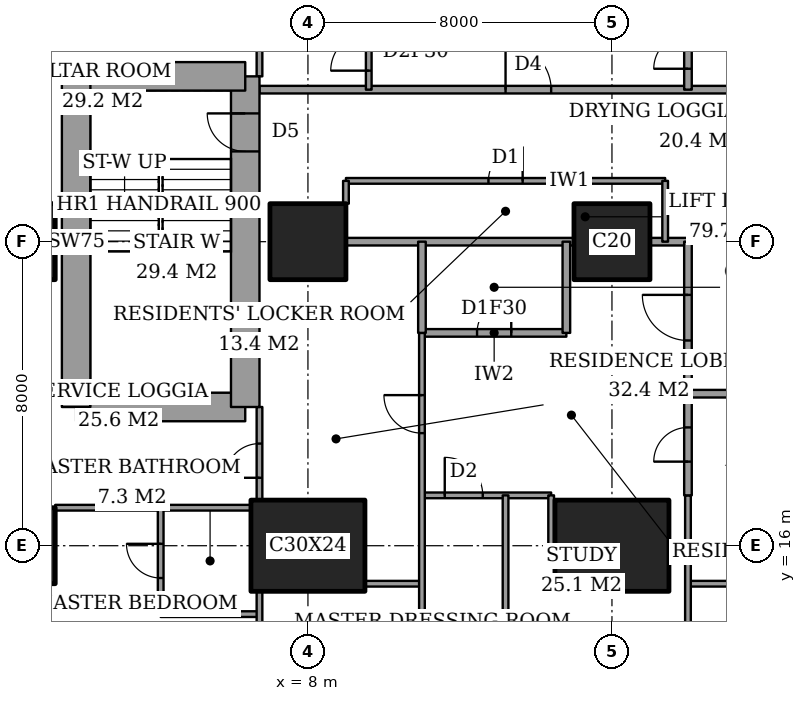
"""IFC4 building model, lengths in metres.
Left out: names, types, materials, properties, quantities, classifications, styles, units other than length and angle.
Written with IfcOpenShell. Run it as: python <this file> out.ifc"""

import sys

from ifc_helpers import new_model, si_unit, direction, frame, frame_2d, origin, origin_2d, place, context, subcontext, project, spatial, rectangle, extrude, element, fill, save


model = new_model("IFC4")
c1 = context("Model", 3, precision=1e-05, world=origin(), true_north=direction((0.0, 1.0)))
c2 = subcontext(c1, "Body", "Model", "MODEL_VIEW")
j1 = project(units=[si_unit("LENGTHUNIT", "METRE"), si_unit("PLANEANGLEUNIT", "RADIAN")], contexts=[c1])
p1 = place(None, origin())
s1 = spatial("IfcSite", under=j1, at=p1, CompositionType="ELEMENT")
p2 = place(p1, origin())
s2 = spatial("IfcBuilding", under=s1, at=p2, CompositionType="ELEMENT")
p3 = place(p2, frame((0.0, 0.0, 146.6)))
s3 = spatial("IfcBuildingStorey", under=s2, at=p3, CompositionType="ELEMENT", Elevation=146.6)
for number, where, z_axis, x_axis in (
    (1, (0.35, 16.0, 0.0), (0.0, 0.0, 1.0), (1.0, 0.0, 0.0)),
    (2, (0.35, 24.0, 0.0), (0.0, 0.0, 1.0), (1.0, 0.0, 0.0)),
):
    element("IfcColumn", number, at=place(p3, frame(where, z_axis=z_axis, x_axis=x_axis)), inside=s3, PredefinedType="COLUMN", context=c2, shape_type="SweptSolid", body=[
        extrude(rectangle(XDim=2.0, YDim=2.0, at=origin_2d()), origin(), (0.0, 0.0, 1.0), 3.6),
    ])
p4 = place(p3, frame((8.0, 16.0, 0.0), z_axis=(0.0, 0.0, 1.0), x_axis=(1.0, 0.0, 0.0)))
e3 = element("IfcColumn", 3, at=p4, inside=s3, PredefinedType="COLUMN", context=c2, shape_type="SweptSolid", body=[
    extrude(rectangle(XDim=3.0, YDim=2.4, at=origin_2d()), origin(), (0.0, 0.0, 1.0), 3.6),
])
p5 = place(p3, frame((8.0, 24.0, 0.0), z_axis=(0.0, 0.0, 1.0), x_axis=(1.0, 0.0, 0.0)))
e4 = element("IfcColumn", 4, at=p5, inside=s3, PredefinedType="COLUMN", context=c2, shape_type="SweptSolid", body=[
    extrude(rectangle(XDim=2.0, YDim=2.0, at=origin_2d()), origin(), (0.0, 0.0, 1.0), 3.6),
])
p6 = place(p3, frame((16.0, 16.0, 0.0), z_axis=(0.0, 0.0, 1.0), x_axis=(1.0, 0.0, 0.0)))
e5 = element("IfcColumn", 5, at=p6, inside=s3, PredefinedType="COLUMN", context=c2, shape_type="SweptSolid", body=[
    extrude(rectangle(XDim=3.0, YDim=2.4, at=origin_2d()), origin(), (0.0, 0.0, 1.0), 3.6),
])
p7 = place(p3, frame((16.0, 24.0, 0.0), z_axis=(0.0, 0.0, 1.0), x_axis=(1.0, 0.0, 0.0)))
e6 = element("IfcColumn", 6, at=p7, inside=s3, PredefinedType="COLUMN", context=c2, shape_type="SweptSolid", body=[
    extrude(rectangle(XDim=2.0, YDim=2.0, at=origin_2d()), origin(), (0.0, 0.0, 1.0), 3.6),
])
p8 = place(p3, frame((1.9, 19.65, 0.0), z_axis=(0.0, 0.0, 1.0), x_axis=(1.0, 0.0, 0.0)))
e7 = element("IfcWall", 7, at=p8, inside=s3, PredefinedType="SHEAR", context=c2, shape_type="SweptSolid", body=[
    extrude(rectangle(XDim=4.45, YDim=0.75, at=frame_2d((2.225, 0.0))), origin(), (0.0, 0.0, 1.0), 3.6),
])
p9 = place(p3, frame((6.35, 19.65, 0.0), z_axis=(0.0, 0.0, 1.0), x_axis=(0.0, 1.0, 0.0)))
e8 = element("IfcWall", 8, at=p9, inside=s3, PredefinedType="SHEAR", context=c2, shape_type="SweptSolid", body=[
    extrude(rectangle(XDim=8.7, YDim=0.75, at=frame_2d((4.35, 0.0))), origin(), (0.0, 0.0, 1.0), 3.6),
])
p10 = place(p9, frame((6.725, 0.0, 0.0)))
e9 = element("IfcOpeningElement", 9, at=p10, cuts=e8, PredefinedType="OPENING", context=c2, shape_type="SweptSolid", body=[
    extrude(rectangle(XDim=1.0, YDim=2.1, at=frame_2d((0.5, 1.05))), frame((0.0, 0.385, 0.0), z_axis=(0.0, -1.0, 0.0), x_axis=(1.0, 0.0, 0.0)), (0.0, 0.0, 1.0), 0.77),
])
p11 = place(p3, frame((6.35, 28.35, 0.0), z_axis=(0.0, 0.0, 1.0), x_axis=(-1.0, 0.0, 0.0)))
e10 = element("IfcWall", 10, at=p11, inside=s3, PredefinedType="SHEAR", context=c2, shape_type="SweptSolid", body=[
    extrude(rectangle(XDim=4.45, YDim=0.75, at=frame_2d((2.225, 0.0))), origin(), (0.0, 0.0, 1.0), 3.6),
])
p12 = place(p3, frame((1.9, 28.35, 0.0), z_axis=(0.0, 0.0, 1.0), x_axis=(0.0, -1.0, 0.0)))
e11 = element("IfcWall", 11, at=p12, inside=s3, PredefinedType="SHEAR", context=c2, shape_type="SweptSolid", body=[
    extrude(rectangle(XDim=8.7, YDim=0.75, at=frame_2d((4.35, 0.0))), origin(), (0.0, 0.0, 1.0), 3.6),
])
p13 = place(p3, frame((4.125, 14.2, 0.0), z_axis=(0.0, 0.0, 1.0), x_axis=(1.0, 0.0, 0.0)))
e12 = element("IfcWall", 12, at=p13, inside=s3, PredefinedType="PARTITIONING", context=c2, shape_type="SweptSolid", body=[
    extrude(rectangle(XDim=2.6, YDim=0.15, at=frame_2d((1.3, 0.0))), origin(), (0.0, 0.0, 1.0), 3.35),
])
p14 = place(p3, frame((9.5, 15.0, 0.0), z_axis=(0.0, 0.0, 1.0), x_axis=(1.0, 0.0, 0.0)))
e13 = element("IfcWall", 13, at=p14, inside=s3, PredefinedType="PARTITIONING", context=c2, shape_type="SweptSolid", body=[
    extrude(rectangle(XDim=1.5, YDim=0.15, at=frame_2d((0.75, 0.0))), origin(), (0.0, 0.0, 1.0), 3.35),
])
p15 = place(p3, frame((18.0, 15.0, 0.0), z_axis=(0.0, 0.0, 1.0), x_axis=(1.0, 0.0, 0.0)))
e14 = element("IfcWall", 14, at=p15, inside=s3, PredefinedType="PARTITIONING", context=c2, shape_type="SweptSolid", body=[
    extrude(rectangle(XDim=6.0, YDim=0.15, at=frame_2d((3.0, 0.0))), origin(), (0.0, 0.0, 1.0), 3.35),
])
p16 = place(p3, frame((17.5, 15.875, 0.0), z_axis=(0.0, 0.0, 1.0), x_axis=(1.0, 0.0, 0.0)))
e15 = element("IfcWall", 15, at=p16, inside=s3, PredefinedType="PARTITIONING", context=c2, shape_type="SweptSolid", body=[
    extrude(rectangle(XDim=0.5, YDim=0.15, at=frame_2d((0.25, 0.0))), origin(), (0.0, 0.0, 1.0), 2.634),
])
p17 = place(p3, frame((1.35, 17.0, 0.0), z_axis=(0.0, 0.0, 1.0), x_axis=(1.0, 0.0, 0.0)))
e16 = element("IfcWall", 16, at=p17, inside=s3, PredefinedType="PARTITIONING", context=c2, shape_type="SweptSolid", body=[
    extrude(rectangle(XDim=5.15, YDim=0.15, at=frame_2d((2.575, 0.0))), origin(), (0.0, 0.0, 1.0), 3.35),
])
p18 = place(p3, frame((11.0, 17.325, 0.0), z_axis=(0.0, 0.0, 1.0), x_axis=(1.0, 0.0, 0.0)))
e17 = element("IfcWall", 17, at=p18, inside=s3, PredefinedType="PARTITIONING", context=c2, shape_type="SweptSolid", body=[
    extrude(rectangle(XDim=3.4, YDim=0.15, at=frame_2d((1.7, 0.0))), origin(), (0.0, 0.0, 1.0), 3.35),
])
p19 = place(p18, frame((0.6, 0.0, 0.0)))
e18 = element("IfcOpeningElement", 18, at=p19, cuts=e17, PredefinedType="OPENING", context=c2, shape_type="SweptSolid", body=[
    extrude(rectangle(XDim=1.0, YDim=2.1, at=frame_2d((0.5, 1.05))), frame((0.0, 0.085, 0.0), z_axis=(0.0, -1.0, 0.0), x_axis=(1.0, 0.0, 0.0)), (0.0, 0.0, 1.0), 0.17),
])
p20 = place(p3, frame((18.0, 20.0, 0.0), z_axis=(0.0, 0.0, 1.0), x_axis=(1.0, 0.0, 0.0)))
e19 = element("IfcWall", 19, at=p20, inside=s3, PredefinedType="PARTITIONING", context=c2, shape_type="SweptSolid", body=[
    extrude(rectangle(XDim=6.0, YDim=0.2, at=frame_2d((3.0, 0.0))), origin(), (0.0, 0.0, 1.0), 3.35),
])
p21 = place(p3, frame((11.0, 21.6, 0.0), z_axis=(0.0, 0.0, 1.0), x_axis=(1.0, 0.0, 0.0)))
e20 = element("IfcWall", 20, at=p21, inside=s3, PredefinedType="PARTITIONING", context=c2, shape_type="SweptSolid", body=[
    extrude(rectangle(XDim=3.8, YDim=0.2, at=frame_2d((1.9, 0.0))), origin(), (0.0, 0.0, 1.0), 3.35),
])
p22 = place(p21, frame((1.45, 0.0, 0.0)))
e21 = element("IfcOpeningElement", 21, at=p22, cuts=e20, PredefinedType="OPENING", context=c2, shape_type="SweptSolid", body=[
    extrude(rectangle(XDim=0.9, YDim=2.1, at=frame_2d((0.45, 1.05))), frame((0.0, 0.11, 0.0), z_axis=(0.0, -1.0, 0.0), x_axis=(1.0, 0.0, 0.0)), (0.0, 0.0, 1.0), 0.22),
])
p23 = place(p3, frame((9.0, 24.0, 0.0), z_axis=(0.0, 0.0, 1.0), x_axis=(1.0, 0.0, 0.0)))
e22 = element("IfcWall", 22, at=p23, inside=s3, PredefinedType="PARTITIONING", context=c2, shape_type="SweptSolid", body=[
    extrude(rectangle(XDim=6.0, YDim=0.2, at=frame_2d((3.0, 0.0))), origin(), (0.0, 0.0, 1.0), 3.35),
])
p24 = place(p3, frame((17.0, 24.0, 0.0), z_axis=(0.0, 0.0, 1.0), x_axis=(1.0, 0.0, 0.0)))
e23 = element("IfcWall", 23, at=p24, inside=s3, PredefinedType="PARTITIONING", context=c2, shape_type="SweptSolid", body=[
    extrude(rectangle(XDim=1.0, YDim=0.2, at=frame_2d((0.5, 0.0))), origin(), (0.0, 0.0, 1.0), 3.35),
])
p25 = place(p3, frame((9.0, 25.6, 0.0), z_axis=(0.0, 0.0, 1.0), x_axis=(1.0, 0.0, 0.0)))
e24 = element("IfcWall", 24, at=p25, inside=s3, PredefinedType="PARTITIONING", context=c2, shape_type="SweptSolid", body=[
    extrude(rectangle(XDim=8.4, YDim=0.15, at=frame_2d((4.2, 0.0))), origin(), (0.0, 0.0, 1.0), 3.35),
])
p26 = place(p25, frame((3.75, 0.0, 0.0)))
e25 = element("IfcOpeningElement", 25, at=p26, cuts=e24, PredefinedType="OPENING", context=c2, shape_type="SweptSolid", body=[
    extrude(rectangle(XDim=0.9, YDim=2.1, at=frame_2d((0.45, 1.05))), frame((0.0, 0.085, 0.0), z_axis=(0.0, -1.0, 0.0), x_axis=(1.0, 0.0, 0.0)), (0.0, 0.0, 1.0), 0.17),
])
p27 = place(p3, frame((6.725, 28.0, 0.0), z_axis=(0.0, 0.0, 1.0), x_axis=(1.0, 0.0, 0.0)))
e26 = element("IfcWall", 26, at=p27, inside=s3, PredefinedType="PARTITIONING", context=c2, shape_type="SweptSolid", body=[
    extrude(rectangle(XDim=17.275, YDim=0.2, at=frame_2d((8.637, 0.0))), origin(), (0.0, 0.0, 1.0), 3.35),
])
p28 = place(p27, frame((6.475, 0.0, 0.0)))
e27 = element("IfcOpeningElement", 27, at=p28, cuts=e26, PredefinedType="OPENING", context=c2, shape_type="SweptSolid", body=[
    extrude(rectangle(XDim=1.2, YDim=2.4, at=frame_2d((0.6, 1.2))), frame((0.0, 0.11, 0.0), z_axis=(0.0, -1.0, 0.0), x_axis=(1.0, 0.0, 0.0)), (0.0, 0.0, 1.0), 0.22),
])
p29 = place(p3, frame((4.125, 14.2, 0.0), z_axis=(0.0, 0.0, 1.0), x_axis=(0.0, 1.0, 0.0)))
e28 = element("IfcWall", 28, at=p29, inside=s3, PredefinedType="PARTITIONING", context=c2, shape_type="SweptSolid", body=[
    extrude(rectangle(XDim=2.8, YDim=0.15, at=frame_2d((1.4, 0.0))), origin(), (0.0, 0.0, 1.0), 3.35),
])
p30 = place(p29, frame((0.95, 0.0, 0.0)))
e29 = element("IfcOpeningElement", 29, at=p30, cuts=e28, PredefinedType="OPENING", context=c2, shape_type="SweptSolid", body=[
    extrude(rectangle(XDim=0.9, YDim=2.1, at=frame_2d((0.45, 1.05))), frame((0.0, 0.085, 0.0), z_axis=(0.0, -1.0, 0.0), x_axis=(1.0, 0.0, 0.0)), (0.0, 0.0, 1.0), 0.17),
])
p31 = place(p3, frame((6.725, 11.0, 0.0), z_axis=(0.0, 0.0, 1.0), x_axis=(0.0, 1.0, 0.0)))
e30 = element("IfcWall", 30, at=p31, inside=s3, PredefinedType="PARTITIONING", context=c2, shape_type="SweptSolid", body=[
    extrude(rectangle(XDim=3.8, YDim=0.15, at=frame_2d((1.9, 0.0))), origin(), (0.0, 0.0, 1.0), 3.35),
])
p32 = place(p31, frame((1.15, 0.0, 0.0)))
e31 = element("IfcOpeningElement", 31, at=p32, cuts=e30, PredefinedType="OPENING", context=c2, shape_type="SweptSolid", body=[
    extrude(rectangle(XDim=0.9, YDim=2.1, at=frame_2d((0.45, 1.05))), frame((0.0, 0.085, 0.0), z_axis=(0.0, -1.0, 0.0), x_axis=(1.0, 0.0, 0.0)), (0.0, 0.0, 1.0), 0.17),
])
p33 = place(p3, frame((6.725, 17.2, 0.0), z_axis=(0.0, 0.0, 1.0), x_axis=(0.0, 1.0, 0.0)))
e32 = element("IfcWall", 32, at=p33, inside=s3, PredefinedType="PARTITIONING", context=c2, shape_type="SweptSolid", body=[
    extrude(rectangle(XDim=2.45, YDim=0.15, at=frame_2d((1.225, 0.0))), origin(), (0.0, 0.0, 1.0), 3.35),
])
p34 = place(p33, frame((0.587, 0.0, 0.0)))
e33 = element("IfcOpeningElement", 33, at=p34, cuts=e32, PredefinedType="OPENING", context=c2, shape_type="SweptSolid", body=[
    extrude(rectangle(XDim=0.9, YDim=2.1, at=frame_2d((0.45, 1.05))), frame((0.0, 0.085, 0.0), z_axis=(0.0, -1.0, 0.0), x_axis=(1.0, 0.0, 0.0)), (0.0, 0.0, 1.0), 0.17),
])
p35 = place(p3, frame((6.725, 28.35, 0.0), z_axis=(0.0, 0.0, 1.0), x_axis=(0.0, 1.0, 0.0)))
e34 = element("IfcWall", 34, at=p35, inside=s3, PredefinedType="PARTITIONING", context=c2, shape_type="SweptSolid", body=[
    extrude(rectangle(XDim=2.45, YDim=0.15, at=frame_2d((1.225, 0.0))), origin(), (0.0, 0.0, 1.0), 3.35),
])
p36 = place(p35, frame((0.913, 0.0, 0.0)))
e35 = element("IfcOpeningElement", 35, at=p36, cuts=e34, PredefinedType="OPENING", context=c2, shape_type="SweptSolid", body=[
    extrude(rectangle(XDim=1.0, YDim=2.1, at=frame_2d((0.5, 1.05))), frame((0.0, 0.085, 0.0), z_axis=(0.0, -1.0, 0.0), x_axis=(1.0, 0.0, 0.0)), (0.0, 0.0, 1.0), 0.17),
])
p37 = place(p3, frame((9.0, 25.0, 0.0), z_axis=(0.0, 0.0, 1.0), x_axis=(0.0, 1.0, 0.0)))
e36 = element("IfcWall", 36, at=p37, inside=s3, PredefinedType="PARTITIONING", context=c2, shape_type="SweptSolid", body=[
    extrude(rectangle(XDim=0.6, YDim=0.15, at=frame_2d((0.3, 0.0))), origin(), (0.0, 0.0, 1.0), 3.35),
])
p38 = place(p3, frame((9.6, 28.0, 0.0), z_axis=(0.0, 0.0, 1.0), x_axis=(0.0, 1.0, 0.0)))
e37 = element("IfcWall", 37, at=p38, inside=s3, PredefinedType="PARTITIONING", context=c2, shape_type="SweptSolid", body=[
    extrude(rectangle(XDim=9.4, YDim=0.15, at=frame_2d((4.7, 0.0))), origin(), (0.0, 0.0, 1.0), 3.35),
])
p39 = place(p38, frame((0.5, 0.0, 0.0)))
e38 = element("IfcOpeningElement", 38, at=p39, cuts=e37, PredefinedType="OPENING", context=c2, shape_type="SweptSolid", body=[
    extrude(rectangle(XDim=1.0, YDim=2.1, at=frame_2d((0.5, 1.05))), frame((0.0, 0.085, 0.0), z_axis=(0.0, -1.0, 0.0), x_axis=(1.0, 0.0, 0.0)), (0.0, 0.0, 1.0), 0.17),
])
p40 = place(p3, frame((11.0, 21.6, 0.0), z_axis=(0.0, 0.0, 1.0), x_axis=(0.0, 1.0, 0.0)))
e39 = element("IfcWall", 39, at=p40, inside=s3, PredefinedType="PARTITIONING", context=c2, shape_type="SweptSolid", body=[
    extrude(rectangle(XDim=2.4, YDim=0.2, at=frame_2d((1.2, 0.0))), origin(), (0.0, 0.0, 1.0), 3.35),
])
p41 = place(p3, frame((11.0, 11.0, 0.0), z_axis=(0.0, 0.0, 1.0), x_axis=(0.0, 1.0, 0.0)))
e40 = element("IfcWall", 40, at=p41, inside=s3, PredefinedType="PARTITIONING", context=c2, shape_type="SweptSolid", body=[
    extrude(rectangle(XDim=10.6, YDim=0.15, at=frame_2d((5.3, 0.0))), origin(), (0.0, 0.0, 1.0), 3.35),
])
p42 = place(p41, frame((7.962, 0.0, 0.0)))
e41 = element("IfcOpeningElement", 41, at=p42, cuts=e40, PredefinedType="OPENING", context=c2, shape_type="SweptSolid", body=[
    extrude(rectangle(XDim=1.0, YDim=2.1, at=frame_2d((0.5, 1.05))), frame((0.0, 0.085, 0.0), z_axis=(0.0, -1.0, 0.0), x_axis=(1.0, 0.0, 0.0)), (0.0, 0.0, 1.0), 0.17),
])
p43 = place(p3, frame((13.2, 11.0, 0.0), z_axis=(0.0, 0.0, 1.0), x_axis=(0.0, 1.0, 0.0)))
e42 = element("IfcWall", 42, at=p43, inside=s3, PredefinedType="PARTITIONING", context=c2, shape_type="SweptSolid", body=[
    extrude(rectangle(XDim=6.325, YDim=0.15, at=frame_2d((3.163, 0.0))), origin(), (0.0, 0.0, 1.0), 3.35),
])
p44 = place(p3, frame((14.4, 15.875, 0.0), z_axis=(0.0, 0.0, 1.0), x_axis=(0.0, 1.0, 0.0)))
e43 = element("IfcWall", 43, at=p44, inside=s3, PredefinedType="PARTITIONING", context=c2, shape_type="SweptSolid", body=[
    extrude(rectangle(XDim=1.45, YDim=0.15, at=frame_2d((0.725, 0.0))), origin(), (0.0, 0.0, 1.0), 3.35),
])
p45 = place(p3, frame((14.8, 21.6, 0.0), z_axis=(0.0, 0.0, 1.0), x_axis=(0.0, 1.0, 0.0)))
e44 = element("IfcWall", 44, at=p45, inside=s3, PredefinedType="PARTITIONING", context=c2, shape_type="SweptSolid", body=[
    extrude(rectangle(XDim=2.4, YDim=0.2, at=frame_2d((1.2, 0.0))), origin(), (0.0, 0.0, 1.0), 3.35),
])
p46 = place(p3, frame((17.4, 24.0, 0.0), z_axis=(0.0, 0.0, 1.0), x_axis=(0.0, 1.0, 0.0)))
e45 = element("IfcWall", 45, at=p46, inside=s3, PredefinedType="PARTITIONING", context=c2, shape_type="SweptSolid", body=[
    extrude(rectangle(XDim=1.6, YDim=0.15, at=frame_2d((0.8, 0.0))), origin(), (0.0, 0.0, 1.0), 3.35),
])
p47 = place(p3, frame((18.0, 17.325, 0.0), z_axis=(0.0, 0.0, 1.0), x_axis=(0.0, 1.0, 0.0)))
e46 = element("IfcWall", 46, at=p47, inside=s3, PredefinedType="PARTITIONING", context=c2, shape_type="SweptSolid", body=[
    extrude(rectangle(XDim=6.675, YDim=0.2, at=frame_2d((3.337, 0.0))), origin(), (0.0, 0.0, 1.0), 3.35),
])
p48 = place(p47, frame((4.075, 0.0, 0.0)))
e47 = element("IfcOpeningElement", 47, at=p48, cuts=e46, PredefinedType="OPENING", context=c2, shape_type="SweptSolid", body=[
    extrude(rectangle(XDim=1.2, YDim=2.4, at=frame_2d((0.6, 1.2))), frame((0.0, 0.11, 0.0), z_axis=(0.0, -1.0, 0.0), x_axis=(1.0, 0.0, 0.0)), (0.0, 0.0, 1.0), 0.22),
])
p49 = place(p47, frame((0.887, 0.0, 0.0)))
e48 = element("IfcOpeningElement", 48, at=p49, cuts=e46, PredefinedType="OPENING", context=c2, shape_type="SweptSolid", body=[
    extrude(rectangle(XDim=0.9, YDim=2.1, at=frame_2d((0.45, 1.05))), frame((0.0, 0.11, 0.0), z_axis=(0.0, -1.0, 0.0), x_axis=(1.0, 0.0, 0.0)), (0.0, 0.0, 1.0), 0.22),
])
p50 = place(p3, frame((18.0, 28.0, 0.0), z_axis=(0.0, 0.0, 1.0), x_axis=(0.0, 1.0, 0.0)))
e49 = element("IfcWall", 49, at=p50, inside=s3, PredefinedType="PARTITIONING", context=c2, shape_type="SweptSolid", body=[
    extrude(rectangle(XDim=3.4, YDim=0.2, at=frame_2d((1.7, 0.0))), origin(), (0.0, 0.0, 1.0), 3.35),
])
p51 = place(p50, frame((0.55, 0.0, 0.0)))
e50 = element("IfcOpeningElement", 50, at=p51, cuts=e49, PredefinedType="OPENING", context=c2, shape_type="SweptSolid", body=[
    extrude(rectangle(XDim=0.9, YDim=2.1, at=frame_2d((0.45, 1.05))), frame((0.0, 0.11, 0.0), z_axis=(0.0, -1.0, 0.0), x_axis=(1.0, 0.0, 0.0)), (0.0, 0.0, 1.0), 0.22),
])
p52 = place(p3, frame((18.0, 11.0, 0.0), z_axis=(0.0, 0.0, 1.0), x_axis=(0.0, 1.0, 0.0)))
e51 = element("IfcWall", 51, at=p52, inside=s3, PredefinedType="PARTITIONING", context=c2, shape_type="SweptSolid", body=[
    extrude(rectangle(XDim=6.325, YDim=0.15, at=frame_2d((3.163, 0.0))), origin(), (0.0, 0.0, 1.0), 3.35),
])
p53 = place(p30, origin())
e52 = element("IfcDoor", 52, at=p53, inside=s3, OperationType="SINGLE_SWING_LEFT", PredefinedType="DOOR", context=c2, shape_type="SweptSolid", body=[
    extrude(rectangle(XDim=0.9, YDim=2.1, at=frame_2d((0.45, 1.05))), frame((0.0, 0.025, 0.0), z_axis=(0.0, -1.0, 0.0), x_axis=(1.0, 0.0, 0.0)), (0.0, 0.0, 1.0), 0.05),
])
fill(e29, e52)
p54 = place(p34, origin())
e53 = element("IfcDoor", 53, at=p54, inside=s3, OperationType="SINGLE_SWING_RIGHT", PredefinedType="DOOR", context=c2, shape_type="SweptSolid", body=[
    extrude(rectangle(XDim=0.9, YDim=2.1, at=frame_2d((0.45, 1.05))), frame((0.0, 0.025, 0.0), z_axis=(0.0, -1.0, 0.0), x_axis=(1.0, 0.0, 0.0)), (0.0, 0.0, 1.0), 0.05),
])
fill(e33, e53)
p55 = place(p42, origin())
e54 = element("IfcDoor", 54, at=p55, inside=s3, OperationType="SINGLE_SWING_LEFT", PredefinedType="DOOR", context=c2, shape_type="SweptSolid", body=[
    extrude(rectangle(XDim=1.0, YDim=2.1, at=frame_2d((0.5, 1.05))), frame((0.0, 0.025, 0.0), z_axis=(0.0, -1.0, 0.0), x_axis=(1.0, 0.0, 0.0)), (0.0, 0.0, 1.0), 0.05),
])
fill(e41, e54)
p56 = place(p22, origin())
e55 = element("IfcDoor", 55, at=p56, inside=s3, OperationType="SINGLE_SWING_LEFT", PredefinedType="DOOR", context=c2, shape_type="SweptSolid", body=[
    extrude(rectangle(XDim=0.9, YDim=2.1, at=frame_2d((0.45, 1.05))), frame((0.0, 0.025, 0.0), z_axis=(0.0, -1.0, 0.0), x_axis=(1.0, 0.0, 0.0)), (0.0, 0.0, 1.0), 0.05),
])
fill(e21, e55)
p57 = place(p48, origin())
e56 = element("IfcDoor", 56, at=p57, inside=s3, OperationType="SINGLE_SWING_LEFT", PredefinedType="DOOR", context=c2, shape_type="SweptSolid", body=[
    extrude(rectangle(XDim=1.2, YDim=2.4, at=frame_2d((0.6, 1.2))), frame((0.0, 0.025, 0.0), z_axis=(0.0, -1.0, 0.0), x_axis=(1.0, 0.0, 0.0)), (0.0, 0.0, 1.0), 0.05),
])
fill(e47, e56)
p58 = place(p19, origin())
e57 = element("IfcDoor", 57, at=p58, inside=s3, OperationType="SINGLE_SWING_RIGHT", PredefinedType="DOOR", context=c2, shape_type="SweptSolid", body=[
    extrude(rectangle(XDim=1.0, YDim=2.1, at=frame_2d((0.5, 1.05))), frame((0.0, 0.025, 0.0), z_axis=(0.0, -1.0, 0.0), x_axis=(1.0, 0.0, 0.0)), (0.0, 0.0, 1.0), 0.05),
])
fill(e18, e57)
p59 = place(p49, origin())
e58 = element("IfcDoor", 58, at=p59, inside=s3, OperationType="SINGLE_SWING_RIGHT", PredefinedType="DOOR", context=c2, shape_type="SweptSolid", body=[
    extrude(rectangle(XDim=0.9, YDim=2.1, at=frame_2d((0.45, 1.05))), frame((0.0, 0.025, 0.0), z_axis=(0.0, -1.0, 0.0), x_axis=(1.0, 0.0, 0.0)), (0.0, 0.0, 1.0), 0.05),
])
fill(e48, e58)
p60 = place(p39, origin())
e59 = element("IfcDoor", 59, at=p60, inside=s3, OperationType="SINGLE_SWING_RIGHT", PredefinedType="DOOR", context=c2, shape_type="SweptSolid", body=[
    extrude(rectangle(XDim=1.0, YDim=2.1, at=frame_2d((0.5, 1.05))), frame((0.0, 0.025, 0.0), z_axis=(0.0, -1.0, 0.0), x_axis=(1.0, 0.0, 0.0)), (0.0, 0.0, 1.0), 0.05),
])
fill(e38, e59)
p61 = place(p28, origin())
e60 = element("IfcDoor", 60, at=p61, inside=s3, OperationType="SINGLE_SWING_RIGHT", PredefinedType="DOOR", context=c2, shape_type="SweptSolid", body=[
    extrude(rectangle(XDim=1.2, YDim=2.4, at=frame_2d((0.6, 1.2))), frame((0.0, 0.025, 0.0), z_axis=(0.0, -1.0, 0.0), x_axis=(1.0, 0.0, 0.0)), (0.0, 0.0, 1.0), 0.05),
])
fill(e27, e60)
p62 = place(p51, origin())
e61 = element("IfcDoor", 61, at=p62, inside=s3, OperationType="SINGLE_SWING_RIGHT", PredefinedType="DOOR", context=c2, shape_type="SweptSolid", body=[
    extrude(rectangle(XDim=0.9, YDim=2.1, at=frame_2d((0.45, 1.05))), frame((0.0, 0.025, 0.0), z_axis=(0.0, -1.0, 0.0), x_axis=(1.0, 0.0, 0.0)), (0.0, 0.0, 1.0), 0.05),
])
fill(e50, e61)
p63 = place(p26, origin())
e62 = element("IfcDoor", 62, at=p63, inside=s3, OperationType="SINGLE_SWING_LEFT", PredefinedType="DOOR", context=c2, shape_type="SweptSolid", body=[
    extrude(rectangle(XDim=0.9, YDim=2.1, at=frame_2d((0.45, 1.05))), frame((0.0, 0.025, 0.0), z_axis=(0.0, -1.0, 0.0), x_axis=(1.0, 0.0, 0.0)), (0.0, 0.0, 1.0), 0.05),
])
fill(e25, e62)
p64 = place(p10, origin())
e63 = element("IfcDoor", 63, at=p64, inside=s3, OperationType="SINGLE_SWING_LEFT", PredefinedType="DOOR", context=c2, shape_type="SweptSolid", body=[
    extrude(rectangle(XDim=1.0, YDim=2.1, at=frame_2d((0.5, 1.05))), frame((0.0, 0.025, 0.0), z_axis=(0.0, -1.0, 0.0), x_axis=(1.0, 0.0, 0.0)), (0.0, 0.0, 1.0), 0.05),
])
fill(e9, e63)
save(model, sys.argv[1])
